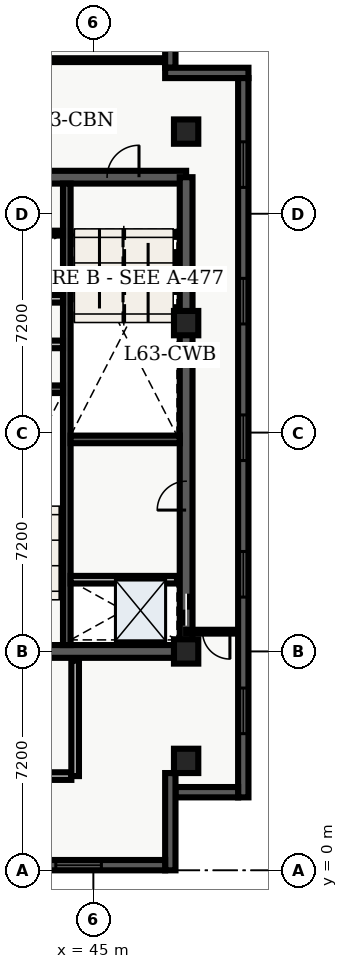
"""IFC4 building model, lengths in metres.
Left out: names, types, materials, properties, quantities, classifications, styles, units other than length and angle.
Written with IfcOpenShell. Run it as: python <this file> out.ifc"""

import sys

from ifc_helpers import new_model, entity, si_unit, converted_unit, direction, frame, origin_with_axes, origin_2d_with_axis, place, context, subcontext, project, spatial, polyline, rectangle, outline, extrude, element, fill, save


model = new_model("IFC4")
c1 = context("Model", 3, precision=1e-05, world=origin_with_axes(), true_north=direction((0.0, 1.0)))
c2 = subcontext(c1, "Body", "Model", "MODEL_VIEW")
j1 = project(units=[si_unit("LENGTHUNIT", "METRE"), converted_unit("PLANEANGLEUNIT", "DEGREE", entity("IfcPlaneAngleMeasure", 0.017), si_unit("PLANEANGLEUNIT", "RADIAN"), dimensions=[0, 0, 0, 0, 0, 0, 0])], contexts=[c1])
p1 = place(None, origin_with_axes())
s1 = spatial("IfcSite", under=j1, at=p1, CompositionType="ELEMENT")
p2 = place(p1, origin_with_axes())
s2 = spatial("IfcBuilding", under=s1, at=p2, CompositionType="ELEMENT")
p3 = place(p2, frame((0.0, 0.0, 256.8), z_axis=(0.0, 0.0, 1.0), x_axis=(1.0, 0.0, 0.0)))
s3 = spatial("IfcBuildingStorey", under=s2, at=p3, CompositionType="ELEMENT", Elevation=256.8)
p4 = place(p3, frame((40.2, 7.2, 0.0), z_axis=(0.0, 0.0, 1.0), x_axis=(1.0, 0.0, 0.0)))
e1 = element("IfcWall", 1, at=p4, inside=s3, PredefinedType="SHEAR", context=c2, shape_type="SweptSolid", body=[
    extrude(outline(polyline([(0.0, -0.21), (7.85, -0.21), (7.85, 0.21), (0.0, 0.21), (0.0, -0.21)])), origin_with_axes(), (0.0, 0.0, 1.0), 3.66),
])
p5 = place(p4, frame((2.175, 0.0, 0.0), z_axis=(0.0, 0.0, 1.0), x_axis=(1.0, 0.0, 0.0)))
e2 = element("IfcOpeningElement", 2, at=p5, cuts=e1, PredefinedType="OPENING", context=c2, shape_type="SweptSolid", body=[
    extrude(rectangle(XDim=1.05, YDim=0.44, at=origin_2d_with_axis()), origin_with_axes(), (0.0, 0.0, 1.0), 2.15),
])
p6 = place(p3, frame((40.2, 22.8, 0.0), z_axis=(0.0, 0.0, 1.0), x_axis=(1.0, 0.0, 0.0)))
e3 = element("IfcWall", 3, at=p6, inside=s3, PredefinedType="SHEAR", context=c2, shape_type="SweptSolid", body=[
    extrude(outline(polyline([(0.0, -0.21), (7.85, -0.21), (7.85, 0.21), (0.0, 0.21), (0.0, -0.21)])), origin_with_axes(), (0.0, 0.0, 1.0), 3.66),
])
p7 = place(p6, frame((5.775, 0.0, 0.0), z_axis=(0.0, 0.0, 1.0), x_axis=(1.0, 0.0, 0.0)))
e4 = element("IfcOpeningElement", 4, at=p7, cuts=e3, PredefinedType="OPENING", context=c2, shape_type="SweptSolid", body=[
    extrude(rectangle(XDim=1.05, YDim=0.44, at=origin_2d_with_axis()), origin_with_axes(), (0.0, 0.0, 1.0), 2.15),
])
p8 = place(p6, frame((2.15, 0.0, 0.0), z_axis=(0.0, 0.0, 1.0), x_axis=(1.0, 0.0, 0.0)))
e5 = element("IfcOpeningElement", 5, at=p8, cuts=e3, PredefinedType="OPENING", context=c2, shape_type="SweptSolid", body=[
    extrude(rectangle(XDim=0.9, YDim=0.44, at=origin_2d_with_axis()), origin_with_axes(), (0.0, 0.0, 1.0), 2.15),
])
p9 = place(p3, frame((48.05, 7.2, 0.0), z_axis=(0.0, 0.0, 1.0), x_axis=(0.0, 1.0, 0.0)))
e6 = element("IfcWall", 6, at=p9, inside=s3, PredefinedType="SHEAR", context=c2, shape_type="SweptSolid", body=[
    extrude(outline(polyline([(0.0, -0.21), (15.6, -0.21), (15.6, 0.21), (0.0, 0.21), (0.0, -0.21)])), origin_with_axes(), (0.0, 0.0, 1.0), 3.66),
])
p10 = place(p9, frame((1.375, 0.0, 0.0), z_axis=(0.0, 0.0, 1.0), x_axis=(1.0, 0.0, 0.0)))
e7 = element("IfcOpeningElement", 7, at=p10, cuts=e6, PredefinedType="OPENING", context=c2, shape_type="SweptSolid", body=[
    extrude(rectangle(XDim=1.05, YDim=0.44, at=origin_2d_with_axis()), origin_with_axes(), (0.0, 0.0, 1.0), 2.15),
])
p11 = place(p9, frame((5.125, 0.0, 0.0), z_axis=(0.0, 0.0, 1.0), x_axis=(1.0, 0.0, 0.0)))
e8 = element("IfcOpeningElement", 8, at=p11, cuts=e6, PredefinedType="OPENING", context=c2, shape_type="SweptSolid", body=[
    extrude(rectangle(XDim=0.95, YDim=0.44, at=origin_2d_with_axis()), origin_with_axes(), (0.0, 0.0, 1.0), 2.15),
])
p12 = place(p3, frame((44.125, 7.41, 0.0), z_axis=(0.0, 0.0, 1.0), x_axis=(0.0, 1.0, 0.0)))
e9 = element("IfcWall", 9, at=p12, inside=s3, PredefinedType="SHEAR", context=c2, shape_type="SweptSolid", body=[
    extrude(outline(polyline([(0.0, -0.125), (15.18, -0.125), (15.18, 0.125), (0.0, 0.125), (0.0, -0.125)])), origin_with_axes(), (0.0, 0.0, 1.0), 3.66),
])
for number, where, z_axis, x_axis in (
    (10, (40.41, 15.825, 0.0), (0.0, 0.0, 1.0), (1.0, 0.0, 0.0)),
    (11, (44.25, 14.175, 0.0), (0.0, 0.0, 1.0), (1.0, 0.0, 0.0)),
):
    element("IfcWall", number, at=place(p3, frame(where, z_axis=z_axis, x_axis=x_axis)), inside=s3, PredefinedType="SHEAR", context=c2, shape_type="SweptSolid", body=[
        extrude(outline(polyline([(0.0, -0.125), (3.59, -0.125), (3.59, 0.125), (0.0, 0.125), (0.0, -0.125)])), origin_with_axes(), (0.0, 0.0, 1.0), 3.66),
    ])
p13 = place(p3, frame((40.5, 17.3, 0.0), z_axis=(0.0, 0.0, 1.0), x_axis=(1.0, 0.0, 0.0)))
e12 = element("IfcWall", 12, at=p13, inside=s3, PredefinedType="SOLIDWALL", context=c2, shape_type="SweptSolid", body=[
    extrude(outline(polyline([(0.0, -0.125), (3.5, -0.125), (3.5, 0.125), (0.0, 0.125), (0.0, -0.125)])), origin_with_axes(), (0.0, 0.0, 1.0), 2.7),
])
p14 = place(p13, frame((2.4, 0.0, 0.0), z_axis=(0.0, 0.0, 1.0), x_axis=(1.0, 0.0, 0.0)))
e13 = element("IfcOpeningElement", 13, at=p14, cuts=e12, PredefinedType="OPENING", context=c2, shape_type="SweptSolid", body=[
    extrude(rectangle(XDim=0.9, YDim=0.27, at=origin_2d_with_axis()), origin_with_axes(), (0.0, 0.0, 1.0), 2.15),
])
p15 = place(p3, frame((40.5, 18.8, 0.0), z_axis=(0.0, 0.0, 1.0), x_axis=(1.0, 0.0, 0.0)))
e14 = element("IfcWall", 14, at=p15, inside=s3, PredefinedType="SOLIDWALL", context=c2, shape_type="SweptSolid", body=[
    extrude(outline(polyline([(0.0, -0.125), (3.5, -0.125), (3.5, 0.125), (0.0, 0.125), (0.0, -0.125)])), origin_with_axes(), (0.0, 0.0, 1.0), 2.7),
])
p16 = place(p3, frame((40.325, 3.1, 0.0), z_axis=(0.0, 0.0, 1.0), x_axis=(1.0, 0.0, 0.0)))
e15 = element("IfcWall", 15, at=p16, inside=s3, PredefinedType="SOLIDWALL", context=c2, shape_type="SweptSolid", body=[
    extrude(outline(polyline([(0.0, -0.125), (3.95, -0.125), (3.95, 0.125), (0.0, 0.125), (0.0, -0.125)])), origin_with_axes(), (0.0, 0.0, 1.0), 2.7),
])
p17 = place(p3, frame((44.4, 3.1, 0.0), z_axis=(0.0, 0.0, 1.0), x_axis=(0.0, 1.0, 0.0)))
e16 = element("IfcWall", 16, at=p17, inside=s3, PredefinedType="SOLIDWALL", context=c2, shape_type="SweptSolid", body=[
    extrude(outline(polyline([(0.0, -0.125), (3.8, -0.125), (3.8, 0.125), (0.0, 0.125), (0.0, -0.125)])), origin_with_axes(), (0.0, 0.0, 1.0), 2.7),
])
for number, where, z_axis, x_axis in (
    (17, (48.05, 3.6, 0.0), (0.0, 0.0, 1.0), (1.0, 0.0, 0.0)),
    (18, (48.05, 7.2, 0.0), (0.0, 0.0, 1.0), (1.0, 0.0, 0.0)),
    (19, (48.05, 18.0, 0.0), (0.0, 0.0, 1.0), (1.0, 0.0, 0.0)),
    (20, (48.05, 24.3, 0.0), (0.0, 0.0, 1.0), (1.0, 0.0, 0.0)),
):
    element("IfcColumn", number, at=place(p3, frame(where, z_axis=z_axis, x_axis=x_axis)), inside=s3, PredefinedType="COLUMN", context=c2, shape_type="SweptSolid", body=[
        extrude(rectangle(XDim=0.8, YDim=0.8, at=origin_2d_with_axis()), origin_with_axes(), (0.0, 0.0, 1.0), 3.9),
    ])
p18 = place(p3, frame((40.5, 20.96, 0.0), z_axis=(0.0, 0.0, 1.0), x_axis=(1.0, 0.0, 0.0)))
e21 = element("IfcWall", 21, at=p18, inside=s3, PredefinedType="PARTITIONING", context=c2, shape_type="SweptSolid", body=[
    extrude(outline(polyline([(0.0, -0.08), (3.5, -0.08), (3.5, 0.08), (0.0, 0.08), (0.0, -0.08)])), origin_with_axes(), (0.0, 0.0, 1.0), 2.7),
])
p19 = place(p3, frame((44.25, 9.56, 0.0), z_axis=(0.0, 0.0, 1.0), x_axis=(1.0, 0.0, 0.0)))
e22 = element("IfcWall", 22, at=p19, inside=s3, PredefinedType="SOLIDWALL", context=c2, shape_type="SweptSolid", body=[
    extrude(outline(polyline([(0.0, -0.125), (3.5, -0.125), (3.5, 0.125), (0.0, 0.125), (0.0, -0.125)])), origin_with_axes(), (0.0, 0.0, 1.0), 2.7),
])
p20 = place(p3, frame((49.765, 7.85, 0.0), z_axis=(0.0, 0.0, 1.0), x_axis=(-1.0, 0.0, 0.0)))
e23 = element("IfcWall", 23, at=p20, inside=s3, PredefinedType="PARTITIONING", context=c2, shape_type="SweptSolid", body=[
    extrude(outline(polyline([(0.0, -0.062), (1.715, -0.062), (1.715, 0.062), (0.0, 0.062), (0.0, -0.062)])), origin_with_axes(), (0.0, 0.0, 1.0), 2.7),
])
p21 = place(p20, frame((0.725, 0.0, 0.0), z_axis=(0.0, 0.0, 1.0), x_axis=(1.0, 0.0, 0.0)))
e24 = element("IfcOpeningElement", 24, at=p21, cuts=e23, PredefinedType="OPENING", context=c2, shape_type="SweptSolid", body=[
    extrude(rectangle(XDim=0.9, YDim=0.145, at=origin_2d_with_axis()), origin_with_axes(), (0.0, 0.0, 1.0), 2.15),
])
p22 = place(p3, frame((34.535, 26.65, 0.0), z_axis=(0.0, 0.0, 1.0), x_axis=(1.0, 0.0, 0.0)))
e25 = element("IfcWall", 25, at=p22, inside=s3, PredefinedType="PARTITIONING", context=c2, shape_type="SweptSolid", body=[
    extrude(outline(polyline([(0.0, -0.062), (12.995, -0.062), (12.995, 0.062), (0.0, 0.062), (0.0, -0.062)])), origin_with_axes(), (0.0, 0.0, 1.0), 2.7),
])
p23 = place(p22, frame((8.465, 0.0, 0.0), z_axis=(0.0, 0.0, 1.0), x_axis=(1.0, 0.0, 0.0)))
e26 = element("IfcOpeningElement", 26, at=p23, cuts=e25, PredefinedType="OPENING", context=c2, shape_type="SweptSolid", body=[
    extrude(rectangle(XDim=1.0, YDim=0.145, at=origin_2d_with_axis()), origin_with_axes(), (0.0, 0.0, 1.0), 2.15),
])
p24 = place(p3, frame((47.53, 28.46, 0.0), z_axis=(0.0, 0.0, 1.0), x_axis=(0.0, -1.0, 0.0)))
e27 = element("IfcWall", 27, at=p24, inside=s3, PredefinedType="SOLIDWALL", context=c2, shape_type="SweptSolid", body=[
    extrude(outline(polyline([(0.0, -0.17), (2.06, -0.17), (2.06, 0.17), (0.0, 0.17), (0.0, -0.17)])), origin_with_axes(), (0.0, 0.0, 1.0), 3.66),
])
p25 = place(p3, frame((47.36, 26.23, 0.0), z_axis=(0.0, 0.0, 1.0), x_axis=(1.0, 0.0, 0.0)))
e28 = element("IfcWall", 28, at=p25, inside=s3, PredefinedType="SOLIDWALL", context=c2, shape_type="SweptSolid", body=[
    extrude(outline(polyline([(0.0, -0.17), (2.74, -0.17), (2.74, 0.17), (0.0, 0.17), (0.0, -0.17)])), origin_with_axes(), (0.0, 0.0, 1.0), 3.66),
])
p26 = place(p3, frame((49.93, 26.06, 0.0), z_axis=(0.0, 0.0, 1.0), x_axis=(0.0, -1.0, 0.0)))
e29 = element("IfcWall", 29, at=p26, inside=s3, PredefinedType="SOLIDWALL", context=c2, shape_type="SweptSolid", body=[
    extrude(outline(polyline([(0.0, -0.17), (23.66, -0.17), (23.66, 0.17), (0.0, 0.17), (0.0, -0.17)])), origin_with_axes(), (0.0, 0.0, 1.0), 3.66),
])
p27 = place(p26, frame((2.846, 0.0, 0.45), z_axis=(0.0, 0.0, 1.0), x_axis=(1.0, 0.0, 0.0)))
e30 = element("IfcOpeningElement", 30, at=p27, cuts=e29, PredefinedType="OPENING", context=c2, shape_type="SweptSolid", body=[
    extrude(rectangle(XDim=1.5, YDim=0.36, at=origin_2d_with_axis()), origin_with_axes(), (0.0, 0.0, 1.0), 2.1),
])
p28 = place(p26, frame((7.338, 0.0, 0.45), z_axis=(0.0, 0.0, 1.0), x_axis=(1.0, 0.0, 0.0)))
e31 = element("IfcOpeningElement", 31, at=p28, cuts=e29, PredefinedType="OPENING", context=c2, shape_type="SweptSolid", body=[
    extrude(rectangle(XDim=1.5, YDim=0.36, at=origin_2d_with_axis()), origin_with_axes(), (0.0, 0.0, 1.0), 2.1),
])
p29 = place(p26, frame((11.83, 0.0, 0.45), z_axis=(0.0, 0.0, 1.0), x_axis=(1.0, 0.0, 0.0)))
e32 = element("IfcOpeningElement", 32, at=p29, cuts=e29, PredefinedType="OPENING", context=c2, shape_type="SweptSolid", body=[
    extrude(rectangle(XDim=1.5, YDim=0.36, at=origin_2d_with_axis()), origin_with_axes(), (0.0, 0.0, 1.0), 2.1),
])
p30 = place(p26, frame((16.322, 0.0, 0.45), z_axis=(0.0, 0.0, 1.0), x_axis=(1.0, 0.0, 0.0)))
e33 = element("IfcOpeningElement", 33, at=p30, cuts=e29, PredefinedType="OPENING", context=c2, shape_type="SweptSolid", body=[
    extrude(rectangle(XDim=1.5, YDim=0.36, at=origin_2d_with_axis()), origin_with_axes(), (0.0, 0.0, 1.0), 2.1),
])
p31 = place(p26, frame((20.814, 0.0, 0.45), z_axis=(0.0, 0.0, 1.0), x_axis=(1.0, 0.0, 0.0)))
e34 = element("IfcOpeningElement", 34, at=p31, cuts=e29, PredefinedType="OPENING", context=c2, shape_type="SweptSolid", body=[
    extrude(rectangle(XDim=1.5, YDim=0.36, at=origin_2d_with_axis()), origin_with_axes(), (0.0, 0.0, 1.0), 2.1),
])
p32 = place(p3, frame((49.76, 2.57, 0.0), z_axis=(0.0, 0.0, 1.0), x_axis=(-1.0, 0.0, 0.0)))
e35 = element("IfcWall", 35, at=p32, inside=s3, PredefinedType="SOLIDWALL", context=c2, shape_type="SweptSolid", body=[
    extrude(outline(polyline([(0.0, -0.17), (2.06, -0.17), (2.06, 0.17), (0.0, 0.17), (0.0, -0.17)])), origin_with_axes(), (0.0, 0.0, 1.0), 3.66),
])
p33 = place(p3, frame((47.53, 3.2, 0.0), z_axis=(0.0, 0.0, 1.0), x_axis=(0.0, -1.0, 0.0)))
e36 = element("IfcWall", 36, at=p33, inside=s3, PredefinedType="SOLIDWALL", context=c2, shape_type="SweptSolid", body=[
    extrude(outline(polyline([(0.0, -0.17), (3.2, -0.17), (3.2, 0.17), (0.0, 0.17), (0.0, -0.17)])), origin_with_axes(), (0.0, 0.0, 1.0), 3.66),
])
p34 = place(p3, frame((47.36, 0.17, 0.0), z_axis=(0.0, 0.0, 1.0), x_axis=(-1.0, 0.0, 0.0)))
e37 = element("IfcWall", 37, at=p34, inside=s3, PredefinedType="SOLIDWALL", context=c2, shape_type="SweptSolid", body=[
    extrude(outline(polyline([(0.0, -0.17), (37.16, -0.17), (37.16, 0.17), (0.0, 0.17), (0.0, -0.17)])), origin_with_axes(), (0.0, 0.0, 1.0), 3.66),
])
p35 = place(p34, frame((2.847, 0.0, 0.45), z_axis=(0.0, 0.0, 1.0), x_axis=(1.0, 0.0, 0.0)))
e38 = element("IfcOpeningElement", 38, at=p35, cuts=e37, PredefinedType="OPENING", context=c2, shape_type="SweptSolid", body=[
    extrude(rectangle(XDim=1.5, YDim=0.36, at=origin_2d_with_axis()), origin_with_axes(), (0.0, 0.0, 1.0), 2.1),
])
p36 = place(p34, frame((7.342, 0.0, 0.45), z_axis=(0.0, 0.0, 1.0), x_axis=(1.0, 0.0, 0.0)))
e39 = element("IfcOpeningElement", 39, at=p36, cuts=e37, PredefinedType="OPENING", context=c2, shape_type="SweptSolid", body=[
    extrude(rectangle(XDim=1.5, YDim=0.36, at=origin_2d_with_axis()), origin_with_axes(), (0.0, 0.0, 1.0), 2.1),
])
p37 = place(p34, frame((11.837, 0.0, 0.45), z_axis=(0.0, 0.0, 1.0), x_axis=(1.0, 0.0, 0.0)))
e40 = element("IfcOpeningElement", 40, at=p37, cuts=e37, PredefinedType="OPENING", context=c2, shape_type="SweptSolid", body=[
    extrude(rectangle(XDim=1.5, YDim=0.36, at=origin_2d_with_axis()), origin_with_axes(), (0.0, 0.0, 1.0), 2.1),
])
p38 = place(p34, frame((16.332, 0.0, 0.45), z_axis=(0.0, 0.0, 1.0), x_axis=(1.0, 0.0, 0.0)))
e41 = element("IfcOpeningElement", 41, at=p38, cuts=e37, PredefinedType="OPENING", context=c2, shape_type="SweptSolid", body=[
    extrude(rectangle(XDim=1.5, YDim=0.36, at=origin_2d_with_axis()), origin_with_axes(), (0.0, 0.0, 1.0), 2.1),
])
p39 = place(p34, frame((21.277, 0.0, 0.45), z_axis=(0.0, 0.0, 1.0), x_axis=(1.0, 0.0, 0.0)))
e42 = element("IfcOpeningElement", 42, at=p39, cuts=e37, PredefinedType="OPENING", context=c2, shape_type="SweptSolid", body=[
    extrude(rectangle(XDim=1.5, YDim=0.36, at=origin_2d_with_axis()), origin_with_axes(), (0.0, 0.0, 1.0), 2.1),
])
p40 = place(p34, frame((25.322, 0.0, 0.45), z_axis=(0.0, 0.0, 1.0), x_axis=(1.0, 0.0, 0.0)))
e43 = element("IfcOpeningElement", 43, at=p40, cuts=e37, PredefinedType="OPENING", context=c2, shape_type="SweptSolid", body=[
    extrude(rectangle(XDim=1.5, YDim=0.36, at=origin_2d_with_axis()), origin_with_axes(), (0.0, 0.0, 1.0), 2.1),
])
p41 = place(p34, frame((29.817, 0.0, 0.45), z_axis=(0.0, 0.0, 1.0), x_axis=(1.0, 0.0, 0.0)))
e44 = element("IfcOpeningElement", 44, at=p41, cuts=e37, PredefinedType="OPENING", context=c2, shape_type="SweptSolid", body=[
    extrude(rectangle(XDim=1.5, YDim=0.36, at=origin_2d_with_axis()), origin_with_axes(), (0.0, 0.0, 1.0), 2.1),
])
p42 = place(p34, frame((34.312, 0.0, 0.45), z_axis=(0.0, 0.0, 1.0), x_axis=(1.0, 0.0, 0.0)))
e45 = element("IfcOpeningElement", 45, at=p42, cuts=e37, PredefinedType="OPENING", context=c2, shape_type="SweptSolid", body=[
    extrude(rectangle(XDim=1.5, YDim=0.36, at=origin_2d_with_axis()), origin_with_axes(), (0.0, 0.0, 1.0), 2.1),
])
p43 = place(p9, frame((1.375, 0.0, 0.0), z_axis=(0.0, 0.0, 1.0), x_axis=(1.0, 0.0, 0.0)))
e46 = element("IfcDoor", 46, at=p43, inside=s3, OperationType="SLIDING_TO_LEFT", PredefinedType="DOOR", context=c2, shape_type="SweptSolid", body=[
    extrude(rectangle(XDim=1.05, YDim=0.09, at=origin_2d_with_axis()), origin_with_axes(), (0.0, 0.0, 1.0), 2.15),
])
fill(e7, e46)
p44 = place(p6, frame((5.775, 0.0, 0.0), z_axis=(0.0, 0.0, 1.0), x_axis=(1.0, 0.0, 0.0)))
e47 = element("IfcDoor", 47, at=p44, inside=s3, OperationType="SINGLE_SWING_RIGHT", PredefinedType="DOOR", context=c2, shape_type="SweptSolid", body=[
    extrude(rectangle(XDim=1.05, YDim=0.09, at=origin_2d_with_axis()), origin_with_axes(), (0.0, 0.0, 1.0), 2.15),
])
fill(e4, e47)
p45 = place(p9, frame((5.125, 0.0, 0.0), z_axis=(0.0, 0.0, 1.0), x_axis=(1.0, 0.0, 0.0)))
e48 = element("IfcDoor", 48, at=p45, inside=s3, OperationType="SINGLE_SWING_LEFT", PredefinedType="DOOR", context=c2, shape_type="SweptSolid", body=[
    extrude(rectangle(XDim=0.95, YDim=0.09, at=origin_2d_with_axis()), origin_with_axes(), (0.0, 0.0, 1.0), 2.15),
])
fill(e8, e48)
p46 = place(p20, frame((0.725, 0.0, 0.0), z_axis=(0.0, 0.0, 1.0), x_axis=(1.0, 0.0, 0.0)))
e49 = element("IfcDoor", 49, at=p46, inside=s3, OperationType="SINGLE_SWING_LEFT", PredefinedType="DOOR", context=c2, shape_type="SweptSolid", body=[
    extrude(rectangle(XDim=0.9, YDim=0.075, at=origin_2d_with_axis()), origin_with_axes(), (0.0, 0.0, 1.0), 2.15),
])
fill(e24, e49)
p47 = place(p26, frame((2.846, 0.0, 0.45), z_axis=(0.0, 0.0, 1.0), x_axis=(1.0, 0.0, 0.0)))
e50 = element("IfcWindow", 50, at=p47, inside=s3, PredefinedType="WINDOW", context=c2, shape_type="SweptSolid", body=[
    extrude(rectangle(XDim=1.5, YDim=0.09, at=origin_2d_with_axis()), origin_with_axes(), (0.0, 0.0, 1.0), 2.1),
])
fill(e30, e50)
p48 = place(p26, frame((7.338, 0.0, 0.45), z_axis=(0.0, 0.0, 1.0), x_axis=(1.0, 0.0, 0.0)))
e51 = element("IfcWindow", 51, at=p48, inside=s3, PredefinedType="WINDOW", context=c2, shape_type="SweptSolid", body=[
    extrude(rectangle(XDim=1.5, YDim=0.09, at=origin_2d_with_axis()), origin_with_axes(), (0.0, 0.0, 1.0), 2.1),
])
fill(e31, e51)
p49 = place(p26, frame((11.83, 0.0, 0.45), z_axis=(0.0, 0.0, 1.0), x_axis=(1.0, 0.0, 0.0)))
e52 = element("IfcWindow", 52, at=p49, inside=s3, PredefinedType="WINDOW", context=c2, shape_type="SweptSolid", body=[
    extrude(rectangle(XDim=1.5, YDim=0.09, at=origin_2d_with_axis()), origin_with_axes(), (0.0, 0.0, 1.0), 2.1),
])
fill(e32, e52)
p50 = place(p26, frame((16.322, 0.0, 0.45), z_axis=(0.0, 0.0, 1.0), x_axis=(1.0, 0.0, 0.0)))
e53 = element("IfcWindow", 53, at=p50, inside=s3, PredefinedType="WINDOW", context=c2, shape_type="SweptSolid", body=[
    extrude(rectangle(XDim=1.5, YDim=0.09, at=origin_2d_with_axis()), origin_with_axes(), (0.0, 0.0, 1.0), 2.1),
])
fill(e33, e53)
p51 = place(p26, frame((20.814, 0.0, 0.45), z_axis=(0.0, 0.0, 1.0), x_axis=(1.0, 0.0, 0.0)))
e54 = element("IfcWindow", 54, at=p51, inside=s3, PredefinedType="WINDOW", context=c2, shape_type="SweptSolid", body=[
    extrude(rectangle(XDim=1.5, YDim=0.09, at=origin_2d_with_axis()), origin_with_axes(), (0.0, 0.0, 1.0), 2.1),
])
fill(e34, e54)
p52 = place(p34, frame((2.847, 0.0, 0.45), z_axis=(0.0, 0.0, 1.0), x_axis=(1.0, 0.0, 0.0)))
e55 = element("IfcWindow", 55, at=p52, inside=s3, PredefinedType="WINDOW", context=c2, shape_type="SweptSolid", body=[
    extrude(rectangle(XDim=1.5, YDim=0.09, at=origin_2d_with_axis()), origin_with_axes(), (0.0, 0.0, 1.0), 2.1),
])
fill(e38, e55)
save(model, sys.argv[1])
